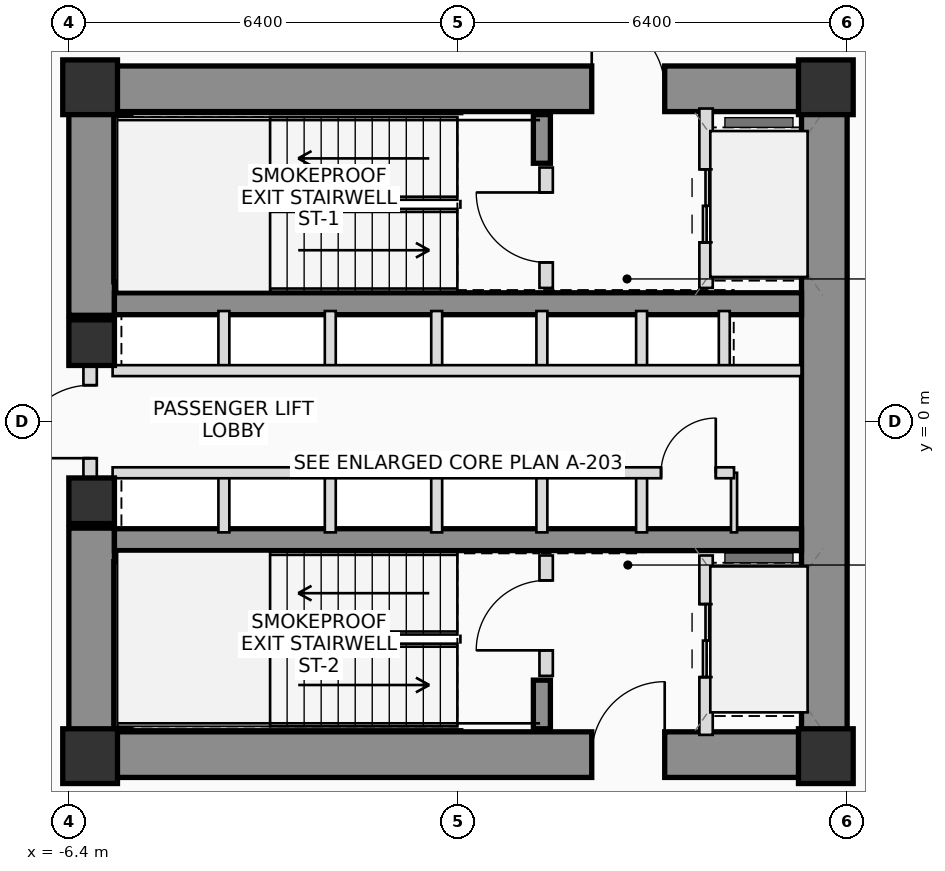
"""IFC4 building model, lengths in metres.
Left out: names, types, materials, properties, quantities, classifications, styles, units other than length and angle.
Written with IfcOpenShell. Run it as: python <this file> out.ifc"""

import sys

from ifc_helpers import new_model, si_unit, direction, frame, frame_2d, origin, origin_2d, place, context, subcontext, project, spatial, rectangle, extrude, source, transform, mapped, element, fill, save


model = new_model("IFC4")
c1 = context("Model", 3, precision=1e-05, world=origin(), true_north=direction((0.0, 1.0)))
c2 = subcontext(c1, "Body", "Model", "MODEL_VIEW")
j1 = project(units=[si_unit("LENGTHUNIT", "METRE"), si_unit("PLANEANGLEUNIT", "RADIAN")], contexts=[c1])
p1 = place(None, origin())
s1 = spatial("IfcSite", under=j1, at=p1, CompositionType="ELEMENT")
p2 = place(p1, origin())
s2 = spatial("IfcBuilding", under=s1, at=p2, CompositionType="ELEMENT")
p3 = place(p2, frame((0.0, 0.0, 8.4)))
s3 = spatial("IfcBuildingStorey", under=s2, at=p3, CompositionType="ELEMENT", Elevation=8.4)
m1 = source(origin(), c2, "Body", "SweptSolid", [
    extrude(rectangle(XDim=0.9, YDim=0.9, at=origin_2d()), origin(), (0.0, 0.0, 1.0), 3.9),
])
for number, where, z_axis, x_axis in (
    (1, (-6.05, -5.5, 0.0), (0.0, 0.0, 1.0), (1.0, 0.0, 0.0)),
    (2, (6.05, -5.5, 0.0), (0.0, 0.0, 1.0), (1.0, 0.0, 0.0)),
    (3, (6.05, 5.5, 0.0), (0.0, 0.0, 1.0), (1.0, 0.0, 0.0)),
    (4, (-6.05, 5.5, 0.0), (0.0, 0.0, 1.0), (1.0, 0.0, 0.0)),
):
    element("IfcColumn", number, at=place(p3, frame(where, z_axis=z_axis, x_axis=x_axis)), inside=s3, PredefinedType="COLUMN", context=c2, shape_type="MappedRepresentation", body=[
        mapped(m1, transform((0.0, 0.0, 0.0), scale=1.0)),
    ])
p4 = place(p3, frame((-6.4, 5.475, 0.0), z_axis=(0.0, 0.0, 1.0), x_axis=(1.0, 0.0, 0.0)))
e5 = element("IfcWall", 5, at=p4, inside=s3, PredefinedType="SHEAR", context=c2, shape_type="SweptSolid", body=[
    extrude(rectangle(XDim=12.8, YDim=0.75, at=frame_2d((6.4, 0.0))), origin(), (0.0, 0.0, 1.0), 3.9),
])
p5 = place(p4, frame((8.6, 0.0, 0.0)))
e6 = element("IfcOpeningElement", 6, at=p5, cuts=e5, PredefinedType="OPENING", context=c2, shape_type="SweptSolid", body=[
    extrude(rectangle(XDim=1.2, YDim=2.2, at=frame_2d((0.6, 1.1))), frame((0.0, 0.385, 0.0), z_axis=(0.0, -1.0, 0.0), x_axis=(1.0, 0.0, 0.0)), (0.0, 0.0, 1.0), 0.77),
])
p6 = place(p3, frame((-6.4, -5.475, 0.0), z_axis=(0.0, 0.0, 1.0), x_axis=(1.0, 0.0, 0.0)))
e7 = element("IfcWall", 7, at=p6, inside=s3, PredefinedType="SHEAR", context=c2, shape_type="SweptSolid", body=[
    extrude(rectangle(XDim=12.8, YDim=0.75, at=frame_2d((6.4, 0.0))), origin(), (0.0, 0.0, 1.0), 3.9),
])
p7 = place(p6, frame((8.6, 0.0, 0.0)))
e8 = element("IfcOpeningElement", 8, at=p7, cuts=e7, PredefinedType="OPENING", context=c2, shape_type="SweptSolid", body=[
    extrude(rectangle(XDim=1.2, YDim=2.2, at=frame_2d((0.6, 1.1))), frame((0.0, 0.385, 0.0), z_axis=(0.0, -1.0, 0.0), x_axis=(1.0, 0.0, 0.0)), (0.0, 0.0, 1.0), 0.77),
])
p8 = place(p3, frame((6.025, -5.1, 0.0), z_axis=(0.0, 0.0, 1.0), x_axis=(0.0, 1.0, 0.0)))
e9 = element("IfcWall", 9, at=p8, inside=s3, PredefinedType="SHEAR", context=c2, shape_type="SweptSolid", body=[
    extrude(rectangle(XDim=10.2, YDim=0.75, at=frame_2d((5.1, 0.0))), origin(), (0.0, 0.0, 1.0), 3.9),
])
for number, where, z_axis, x_axis in (
    (10, (-6.025, -5.1, 0.0), (0.0, 0.0, 1.0), (0.0, 1.0, 0.0)),
    (11, (-6.025, 1.75, 0.0), (0.0, 0.0, 1.0), (0.0, 1.0, 0.0)),
):
    element("IfcWall", number, at=place(p3, frame(where, z_axis=z_axis, x_axis=x_axis)), inside=s3, PredefinedType="SHEAR", context=c2, shape_type="SweptSolid", body=[
        extrude(rectangle(XDim=3.35, YDim=0.75, at=frame_2d((1.675, 0.0))), origin(), (0.0, 0.0, 1.0), 3.9),
    ])
for number, where, z_axis, x_axis in (
    (12, (-5.65, 1.94, 0.0), (0.0, 0.0, 1.0), (1.0, 0.0, 0.0)),
    (13, (-5.65, -1.94, 0.0), (0.0, 0.0, 1.0), (1.0, 0.0, 0.0)),
):
    element("IfcWall", number, at=place(p3, frame(where, z_axis=z_axis, x_axis=x_axis)), inside=s3, PredefinedType="SHEAR", context=c2, shape_type="SweptSolid", body=[
        extrude(rectangle(XDim=11.3, YDim=0.36, at=frame_2d((5.65, 0.0))), origin(), (0.0, 0.0, 1.0), 3.9),
    ])
p9 = place(p3, frame((-5.52, 2.3, 0.0), z_axis=(0.0, 0.0, 1.0), x_axis=(0.0, 1.0, 0.0)))
e14 = element("IfcWall", 14, at=p9, inside=s3, PredefinedType="SHEAR", context=c2, shape_type="SweptSolid", body=[
    extrude(rectangle(XDim=2.75, YDim=0.28, at=frame_2d((1.375, 0.0))), origin(), (0.0, 0.0, 1.0), 3.9),
])
p10 = place(p3, frame((1.38, 4.25, 0.0), z_axis=(0.0, 0.0, 1.0), x_axis=(0.0, 1.0, 0.0)))
e15 = element("IfcWall", 15, at=p10, inside=s3, PredefinedType="SHEAR", context=c2, shape_type="SweptSolid", body=[
    extrude(rectangle(XDim=0.8, YDim=0.28, at=frame_2d((0.4, 0.0))), origin(), (0.0, 0.0, 1.0), 3.9),
])
p11 = place(p3, frame((-5.52, -5.05, 0.0), z_axis=(0.0, 0.0, 1.0), x_axis=(0.0, 1.0, 0.0)))
e16 = element("IfcWall", 16, at=p11, inside=s3, PredefinedType="SHEAR", context=c2, shape_type="SweptSolid", body=[
    extrude(rectangle(XDim=2.75, YDim=0.28, at=frame_2d((1.375, 0.0))), origin(), (0.0, 0.0, 1.0), 3.9),
])
p12 = place(p3, frame((1.38, -5.05, 0.0), z_axis=(0.0, 0.0, 1.0), x_axis=(0.0, 1.0, 0.0)))
e17 = element("IfcWall", 17, at=p12, inside=s3, PredefinedType="SHEAR", context=c2, shape_type="SweptSolid", body=[
    extrude(rectangle(XDim=0.8, YDim=0.28, at=frame_2d((0.4, 0.0))), origin(), (0.0, 0.0, 1.0), 3.9),
])
m2 = source(origin(), c2, "Body", "SweptSolid", [
    extrude(rectangle(XDim=0.75, YDim=0.75, at=origin_2d()), origin(), (0.0, 0.0, 1.0), 3.9),
])
for number, where, z_axis, x_axis in (
    (18, (-6.025, -1.3, 0.0), (0.0, 0.0, 1.0), (1.0, 0.0, 0.0)),
    (19, (-6.025, 1.3, 0.0), (0.0, 0.0, 1.0), (1.0, 0.0, 0.0)),
):
    element("IfcColumn", number, at=place(p3, frame(where, z_axis=z_axis, x_axis=x_axis)), inside=s3, PredefinedType="COLUMN", context=c2, shape_type="MappedRepresentation", body=[
        mapped(m2, transform((0.0, 0.0, 0.0), scale=1.0)),
    ])
p13 = place(p3, frame((-6.05, -0.95, 0.0), z_axis=(0.0, 0.0, 1.0), x_axis=(0.0, 1.0, 0.0)))
e20 = element("IfcWall", 20, at=p13, inside=s3, PredefinedType="PLUMBINGWALL", context=c2, shape_type="SweptSolid", body=[
    extrude(rectangle(XDim=1.9, YDim=0.22, at=frame_2d((0.95, 0.0))), origin(), (0.0, 0.0, 1.0), 2.55),
])
p14 = place(p13, frame((0.35, 0.0, 0.0)))
e21 = element("IfcOpeningElement", 21, at=p14, cuts=e20, PredefinedType="OPENING", context=c2, shape_type="SweptSolid", body=[
    extrude(rectangle(XDim=1.2, YDim=2.2, at=frame_2d((0.6, 1.1))), frame((0.0, 0.12, 0.0), z_axis=(0.0, -1.0, 0.0), x_axis=(1.0, 0.0, 0.0)), (0.0, 0.0, 1.0), 0.24),
])
p15 = place(p3, frame((1.45, 2.2, 0.0), z_axis=(0.0, 0.0, 1.0), x_axis=(0.0, 1.0, 0.0)))
e22 = element("IfcWall", 22, at=p15, inside=s3, PredefinedType="PLUMBINGWALL", context=c2, shape_type="SweptSolid", body=[
    extrude(rectangle(XDim=1.98, YDim=0.22, at=frame_2d((0.99, 0.0))), origin(), (0.0, 0.0, 1.0), 3.57),
])
p16 = place(p15, frame((0.42, 0.0, 0.0)))
e23 = element("IfcOpeningElement", 23, at=p16, cuts=e22, PredefinedType="OPENING", context=c2, shape_type="SweptSolid", body=[
    extrude(rectangle(XDim=1.15, YDim=2.15, at=frame_2d((0.575, 1.075))), frame((0.0, 0.12, 0.0), z_axis=(0.0, -1.0, 0.0), x_axis=(1.0, 0.0, 0.0)), (0.0, 0.0, 1.0), 0.24),
])
p17 = place(p3, frame((4.08, 2.2, 0.0), z_axis=(0.0, 0.0, 1.0), x_axis=(0.0, 1.0, 0.0)))
e24 = element("IfcWall", 24, at=p17, inside=s3, PredefinedType="PLUMBINGWALL", context=c2, shape_type="SweptSolid", body=[
    extrude(rectangle(XDim=2.95, YDim=0.22, at=frame_2d((1.475, 0.0))), origin(), (0.0, 0.0, 1.0), 3.57),
])
p18 = place(p17, frame((0.75, 0.0, 0.0)))
e25 = element("IfcOpeningElement", 25, at=p18, cuts=e24, PredefinedType="OPENING", context=c2, shape_type="SweptSolid", body=[
    extrude(rectangle(XDim=1.2, YDim=2.25, at=frame_2d((0.6, 1.125))), frame((0.0, 0.12, 0.0), z_axis=(0.0, -1.0, 0.0), x_axis=(1.0, 0.0, 0.0)), (0.0, 0.0, 1.0), 0.24),
])
p19 = place(p3, frame((1.45, -4.18, 0.0), z_axis=(0.0, 0.0, 1.0), x_axis=(0.0, 1.0, 0.0)))
e26 = element("IfcWall", 26, at=p19, inside=s3, PredefinedType="PLUMBINGWALL", context=c2, shape_type="SweptSolid", body=[
    extrude(rectangle(XDim=1.98, YDim=0.22, at=frame_2d((0.99, 0.0))), origin(), (0.0, 0.0, 1.0), 3.57),
])
p20 = place(p19, frame((0.42, 0.0, 0.0)))
e27 = element("IfcOpeningElement", 27, at=p20, cuts=e26, PredefinedType="OPENING", context=c2, shape_type="SweptSolid", body=[
    extrude(rectangle(XDim=1.15, YDim=2.15, at=frame_2d((0.575, 1.075))), frame((0.0, 0.12, 0.0), z_axis=(0.0, -1.0, 0.0), x_axis=(1.0, 0.0, 0.0)), (0.0, 0.0, 1.0), 0.24),
])
p21 = place(p3, frame((4.08, -5.15, 0.0), z_axis=(0.0, 0.0, 1.0), x_axis=(0.0, 1.0, 0.0)))
e28 = element("IfcWall", 28, at=p21, inside=s3, PredefinedType="PLUMBINGWALL", context=c2, shape_type="SweptSolid", body=[
    extrude(rectangle(XDim=2.95, YDim=0.22, at=frame_2d((1.475, 0.0))), origin(), (0.0, 0.0, 1.0), 3.57),
])
p22 = place(p21, frame((0.95, 0.0, 0.0)))
e29 = element("IfcOpeningElement", 29, at=p22, cuts=e28, PredefinedType="OPENING", context=c2, shape_type="SweptSolid", body=[
    extrude(rectangle(XDim=1.2, YDim=2.25, at=frame_2d((0.6, 1.125))), frame((0.0, 0.12, 0.0), z_axis=(0.0, -1.0, 0.0), x_axis=(1.0, 0.0, 0.0)), (0.0, 0.0, 1.0), 0.24),
])
for number, where, z_axis, x_axis in (
    (30, (-3.85, 0.84, 0.0), (0.0, 0.0, 1.0), (0.0, 1.0, 0.0)),
    (31, (-3.85, -1.82, 0.0), (0.0, 0.0, 1.0), (0.0, 1.0, 0.0)),
    (32, (-2.1, 0.84, 0.0), (0.0, 0.0, 1.0), (0.0, 1.0, 0.0)),
    (33, (-2.1, -1.82, 0.0), (0.0, 0.0, 1.0), (0.0, 1.0, 0.0)),
    (34, (-0.35, 0.84, 0.0), (0.0, 0.0, 1.0), (0.0, 1.0, 0.0)),
    (35, (-0.35, -1.82, 0.0), (0.0, 0.0, 1.0), (0.0, 1.0, 0.0)),
    (36, (1.38, 0.84, 0.0), (0.0, 0.0, 1.0), (0.0, 1.0, 0.0)),
    (37, (1.38, -1.82, 0.0), (0.0, 0.0, 1.0), (0.0, 1.0, 0.0)),
    (38, (3.02, 0.84, 0.0), (0.0, 0.0, 1.0), (0.0, 1.0, 0.0)),
    (39, (4.38, 0.84, 0.0), (0.0, 0.0, 1.0), (0.0, 1.0, 0.0)),
    (40, (3.02, -1.82, 0.0), (0.0, 0.0, 1.0), (0.0, 1.0, 0.0)),
):
    element("IfcWall", number, at=place(p3, frame(where, z_axis=z_axis, x_axis=x_axis)), inside=s3, PredefinedType="PLUMBINGWALL", context=c2, shape_type="SweptSolid", body=[
        extrude(rectangle(XDim=0.98, YDim=0.18, at=frame_2d((0.49, 0.0))), origin(), (0.0, 0.0, 1.0), 3.57),
    ])
p23 = place(p3, frame((4.54, -1.82, 0.0), z_axis=(0.0, 0.0, 1.0), x_axis=(0.0, 1.0, 0.0)))
e41 = element("IfcWall", 41, at=p23, inside=s3, PredefinedType="PARTITIONING", context=c2, shape_type="SweptSolid", body=[
    extrude(rectangle(XDim=0.98, YDim=0.1, at=frame_2d((0.49, 0.0))), origin(), (0.0, 0.0, 1.0), 3.57),
])
p24 = place(p3, frame((-5.68, 0.84, 0.0), z_axis=(0.0, 0.0, 1.0), x_axis=(1.0, 0.0, 0.0)))
e42 = element("IfcWall", 42, at=p24, inside=s3, PredefinedType="PLUMBINGWALL", context=c2, shape_type="SweptSolid", body=[
    extrude(rectangle(XDim=11.33, YDim=0.18, at=frame_2d((5.665, 0.0))), origin(), (0.0, 0.0, 1.0), 3.57),
])
p25 = place(p3, frame((-5.68, -0.84, 0.0), z_axis=(0.0, 0.0, 1.0), x_axis=(1.0, 0.0, 0.0)))
e43 = element("IfcWall", 43, at=p25, inside=s3, PredefinedType="PLUMBINGWALL", context=c2, shape_type="SweptSolid", body=[
    extrude(rectangle(XDim=10.22, YDim=0.18, at=frame_2d((5.11, 0.0))), origin(), (0.0, 0.0, 1.0), 3.57),
])
p26 = place(p25, frame((9.02, 0.0, 0.0)))
e44 = element("IfcOpeningElement", 44, at=p26, cuts=e43, PredefinedType="OPENING", context=c2, shape_type="SweptSolid", body=[
    extrude(rectangle(XDim=0.9, YDim=2.05, at=frame_2d((0.45, 1.025))), frame((0.0, 0.1, 0.0), z_axis=(0.0, -1.0, 0.0), x_axis=(1.0, 0.0, 0.0)), (0.0, 0.0, 1.0), 0.2),
])
p27 = place(p5, origin())
e45 = element("IfcDoor", 45, at=p27, inside=s3, OperationType="SINGLE_SWING_LEFT", PredefinedType="DOOR", context=c2, shape_type="SweptSolid", body=[
    extrude(rectangle(XDim=1.2, YDim=2.2, at=frame_2d((0.6, 1.1))), frame((0.0, 0.025, 0.0), z_axis=(0.0, -1.0, 0.0), x_axis=(1.0, 0.0, 0.0)), (0.0, 0.0, 1.0), 0.05),
])
fill(e6, e45)
p28 = place(p7, origin())
e46 = element("IfcDoor", 46, at=p28, inside=s3, OperationType="SINGLE_SWING_RIGHT", PredefinedType="DOOR", context=c2, shape_type="SweptSolid", body=[
    extrude(rectangle(XDim=1.2, YDim=2.2, at=frame_2d((0.6, 1.1))), frame((0.0, 0.025, 0.0), z_axis=(0.0, -1.0, 0.0), x_axis=(1.0, 0.0, 0.0)), (0.0, 0.0, 1.0), 0.05),
])
fill(e8, e46)
p29 = place(p14, origin())
e47 = element("IfcDoor", 47, at=p29, inside=s3, OperationType="SINGLE_SWING_LEFT", PredefinedType="DOOR", context=c2, shape_type="SweptSolid", body=[
    extrude(rectangle(XDim=1.2, YDim=2.2, at=frame_2d((0.6, 1.1))), frame((0.0, 0.025, 0.0), z_axis=(0.0, -1.0, 0.0), x_axis=(1.0, 0.0, 0.0)), (0.0, 0.0, 1.0), 0.05),
])
fill(e21, e47)
p30 = place(p16, origin())
e48 = element("IfcDoor", 48, at=p30, inside=s3, OperationType="SINGLE_SWING_RIGHT", PredefinedType="DOOR", context=c2, shape_type="SweptSolid", body=[
    extrude(rectangle(XDim=1.15, YDim=2.15, at=frame_2d((0.575, 1.075))), frame((0.0, 0.025, 0.0), z_axis=(0.0, -1.0, 0.0), x_axis=(1.0, 0.0, 0.0)), (0.0, 0.0, 1.0), 0.05),
])
fill(e23, e48)
p31 = place(p18, origin())
e49 = element("IfcDoor", 49, at=p31, inside=s3, OperationType="DOUBLE_DOOR_SLIDING", PredefinedType="DOOR", context=c2, shape_type="SweptSolid", body=[
    extrude(rectangle(XDim=1.2, YDim=2.25, at=frame_2d((0.6, 1.125))), frame((0.0, 0.025, 0.0), z_axis=(0.0, -1.0, 0.0), x_axis=(1.0, 0.0, 0.0)), (0.0, 0.0, 1.0), 0.05),
])
fill(e25, e49)
p32 = place(p20, origin())
e50 = element("IfcDoor", 50, at=p32, inside=s3, OperationType="SINGLE_SWING_LEFT", PredefinedType="DOOR", context=c2, shape_type="SweptSolid", body=[
    extrude(rectangle(XDim=1.15, YDim=2.15, at=frame_2d((0.575, 1.075))), frame((0.0, 0.025, 0.0), z_axis=(0.0, -1.0, 0.0), x_axis=(1.0, 0.0, 0.0)), (0.0, 0.0, 1.0), 0.05),
])
fill(e27, e50)
p33 = place(p22, origin())
e51 = element("IfcDoor", 51, at=p33, inside=s3, OperationType="DOUBLE_DOOR_SLIDING", PredefinedType="DOOR", context=c2, shape_type="SweptSolid", body=[
    extrude(rectangle(XDim=1.2, YDim=2.25, at=frame_2d((0.6, 1.125))), frame((0.0, 0.025, 0.0), z_axis=(0.0, -1.0, 0.0), x_axis=(1.0, 0.0, 0.0)), (0.0, 0.0, 1.0), 0.05),
])
fill(e29, e51)
p34 = place(p26, origin())
e52 = element("IfcDoor", 52, at=p34, inside=s3, OperationType="SINGLE_SWING_RIGHT", PredefinedType="DOOR", context=c2, shape_type="SweptSolid", body=[
    extrude(rectangle(XDim=0.9, YDim=2.05, at=frame_2d((0.45, 1.025))), frame((0.0, 0.025, 0.0), z_axis=(0.0, -1.0, 0.0), x_axis=(1.0, 0.0, 0.0)), (0.0, 0.0, 1.0), 0.05),
])
fill(e44, e52)
save(model, sys.argv[1])
